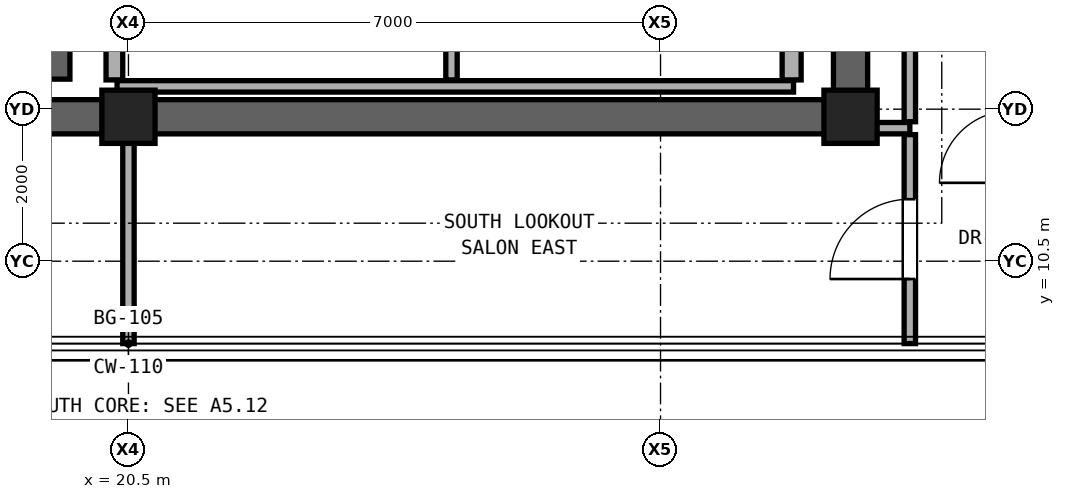
"""IFC4 building model, lengths in metres.
Left out: names, types, materials, properties, quantities, classifications, styles, units other than length and angle.
Written with IfcOpenShell. Run it as: python <this file> out.ifc"""

import sys

from ifc_helpers import new_model, si_unit, direction, frame, frame_2d, origin, origin_2d, place, context, subcontext, project, spatial, rectangle, extrude, element, fill, save


model = new_model("IFC4")
c1 = context("Model", 3, precision=1e-05, world=origin(), true_north=direction((0.0, 1.0)))
c2 = subcontext(c1, "Body", "Model", "MODEL_VIEW")
j1 = project(units=[si_unit("LENGTHUNIT", "METRE"), si_unit("PLANEANGLEUNIT", "RADIAN")], contexts=[c1])
p1 = place(None, origin())
s1 = spatial("IfcSite", under=j1, at=p1, CompositionType="ELEMENT")
p2 = place(p1, origin())
s2 = spatial("IfcBuilding", under=s1, at=p2, CompositionType="ELEMENT")
p3 = place(p2, frame((0.0, 0.0, 259.9)))
s3 = spatial("IfcBuildingStorey", under=s2, at=p3, CompositionType="ELEMENT", Elevation=259.9)
for number, where, z_axis, x_axis in (
    (1, (20.5, 12.4, 0.0), (0.0, 0.0, 1.0), (1.0, 0.0, 0.0)),
    (2, (30.0, 12.4, 0.0), (0.0, 0.0, 1.0), (1.0, 0.0, 0.0)),
):
    element("IfcColumn", number, at=place(p3, frame(where, z_axis=z_axis, x_axis=x_axis)), inside=s3, PredefinedType="COLUMN", context=c2, shape_type="SweptSolid", body=[
        extrude(rectangle(XDim=0.7, YDim=0.7, at=origin_2d()), origin(), (0.0, 0.0, 1.0), 3.6),
    ])
p4 = place(p3, frame((11.0, 12.4, 0.0), z_axis=(0.0, 0.0, 1.0), x_axis=(1.0, 0.0, 0.0)))
e3 = element("IfcWall", 3, at=p4, inside=s3, PredefinedType="SHEAR", context=c2, shape_type="SweptSolid", body=[
    extrude(rectangle(XDim=19.0, YDim=0.45, at=frame_2d((9.5, 0.0))), origin(), (0.0, 0.0, 1.0), 2.95),
])
p5 = place(p3, frame((30.0, 12.4, 0.0), z_axis=(0.0, 0.0, 1.0), x_axis=(0.0, 1.0, 0.0)))
e4 = element("IfcWall", 4, at=p5, inside=s3, PredefinedType="SHEAR", context=c2, shape_type="SweptSolid", body=[
    extrude(rectangle(XDim=6.0, YDim=0.45, at=frame_2d((3.0, 0.0))), origin(), (0.0, 0.0, 1.0), 2.95),
])
p6 = place(p3, frame((30.22, 12.25, 0.0), z_axis=(0.0, 0.0, 1.0), x_axis=(1.0, 0.0, 0.0)))
e5 = element("IfcWall", 5, at=p6, inside=s3, PredefinedType="PARTITIONING", context=c2, shape_type="SweptSolid", body=[
    extrude(rectangle(XDim=0.56, YDim=0.15, at=frame_2d((0.28, 0.0))), origin(), (0.0, 0.0, 1.0), 2.95),
])
p7 = place(p3, frame((20.35, 12.8, 0.0), z_axis=(0.0, 0.0, 1.0), x_axis=(1.0, 0.0, 0.0)))
e6 = element("IfcWall", 6, at=p7, inside=s3, PredefinedType="PARTITIONING", context=c2, shape_type="SweptSolid", body=[
    extrude(rectangle(XDim=8.9, YDim=0.15, at=frame_2d((4.45, 0.0))), origin(), (0.0, 0.0, 1.0), 2.95),
])
p8 = place(p3, frame((11.27, 13.12, 0.0), z_axis=(0.0, 0.0, 1.0), x_axis=(1.0, 0.0, 0.0)))
e7 = element("IfcWall", 7, at=p8, inside=s3, PredefinedType="SHEAR", context=c2, shape_type="SweptSolid", body=[
    extrude(rectangle(XDim=8.46, YDim=0.45, at=frame_2d((4.23, 0.0))), origin(), (0.0, 0.0, 1.0), 2.95),
])
p9 = place(p3, frame((20.315, 12.885, 0.0), z_axis=(0.0, 0.0, 1.0), x_axis=(0.0, 1.0, 0.0)))
e8 = element("IfcWall", 8, at=p9, inside=s3, PredefinedType="SOLIDWALL", context=c2, shape_type="SweptSolid", body=[
    extrude(rectangle(XDim=3.2, YDim=0.22, at=frame_2d((1.6, 0.0))), origin(), (0.0, 0.0, 1.0), 2.95),
])
p10 = place(p3, frame((20.5, 9.416, 0.0), z_axis=(0.0, 0.0, 1.0), x_axis=(0.0, 1.0, 0.0)))
e9 = element("IfcWall", 9, at=p10, inside=s3, PredefinedType="PARTITIONING", context=c2, shape_type="SweptSolid", body=[
    extrude(rectangle(XDim=2.764, YDim=0.15, at=frame_2d((1.382, 0.0))), origin(), (0.0, 0.0, 1.0), 2.95),
])
p11 = place(p3, frame((24.75, 12.885, 0.0), z_axis=(0.0, 0.0, 1.0), x_axis=(0.0, 1.0, 0.0)))
e10 = element("IfcWall", 10, at=p11, inside=s3, PredefinedType="PARTITIONING", context=c2, shape_type="SweptSolid", body=[
    extrude(rectangle(XDim=2.542, YDim=0.15, at=frame_2d((1.271, 0.0))), origin(), (0.0, 0.0, 1.0), 2.95),
])
p12 = place(p11, frame((0.796, 0.0, 0.0)))
e11 = element("IfcOpeningElement", 11, at=p12, cuts=e10, PredefinedType="OPENING", context=c2, shape_type="SweptSolid", body=[
    extrude(rectangle(XDim=0.95, YDim=2.15, at=frame_2d((0.475, 1.075))), frame((0.0, 0.085, 0.0), z_axis=(0.0, -1.0, 0.0), x_axis=(1.0, 0.0, 0.0)), (0.0, 0.0, 1.0), 0.17),
])
p13 = place(p3, frame((29.225, 12.885, 0.0), z_axis=(0.0, 0.0, 1.0), x_axis=(0.0, 1.0, 0.0)))
e12 = element("IfcWall", 12, at=p13, inside=s3, PredefinedType="SOLIDWALL", context=c2, shape_type="SweptSolid", body=[
    extrude(rectangle(XDim=2.542, YDim=0.25, at=frame_2d((1.271, 0.0))), origin(), (0.0, 0.0, 1.0), 2.95),
])
p14 = place(p3, frame((30.78, 9.416, 0.0), z_axis=(0.0, 0.0, 1.0), x_axis=(0.0, 1.0, 0.0)))
e13 = element("IfcWall", 13, at=p14, inside=s3, PredefinedType="PARTITIONING", context=c2, shape_type="SweptSolid", body=[
    extrude(rectangle(XDim=2.749, YDim=0.15, at=frame_2d((1.375, 0.0))), origin(), (0.0, 0.0, 1.0), 2.95),
])
p15 = place(p14, frame((0.85, 0.0, 0.0)))
e14 = element("IfcOpeningElement", 14, at=p15, cuts=e13, PredefinedType="OPENING", context=c2, shape_type="SweptSolid", body=[
    extrude(rectangle(XDim=1.05, YDim=2.2, at=frame_2d((0.525, 1.1))), frame((0.0, 0.085, 0.0), z_axis=(0.0, -1.0, 0.0), x_axis=(1.0, 0.0, 0.0)), (0.0, 0.0, 1.0), 0.17),
])
p16 = place(p3, frame((30.78, 12.335, 0.0), z_axis=(0.0, 0.0, 1.0), x_axis=(0.0, 1.0, 0.0)))
e15 = element("IfcWall", 15, at=p16, inside=s3, PredefinedType="PARTITIONING", context=c2, shape_type="SweptSolid", body=[
    extrude(rectangle(XDim=5.98, YDim=0.15, at=frame_2d((2.99, 0.0))), origin(), (0.0, 0.0, 1.0), 2.393),
])
p17 = place(p15, origin())
e16 = element("IfcDoor", 16, at=p17, inside=s3, OperationType="SINGLE_SWING_LEFT", PredefinedType="DOOR", context=c2, shape_type="SweptSolid", body=[
    extrude(rectangle(XDim=1.05, YDim=2.2, at=frame_2d((0.525, 1.1))), frame((0.0, 0.025, 0.0), z_axis=(0.0, -1.0, 0.0), x_axis=(1.0, 0.0, 0.0)), (0.0, 0.0, 1.0), 0.05),
])
fill(e14, e16)
save(model, sys.argv[1])
